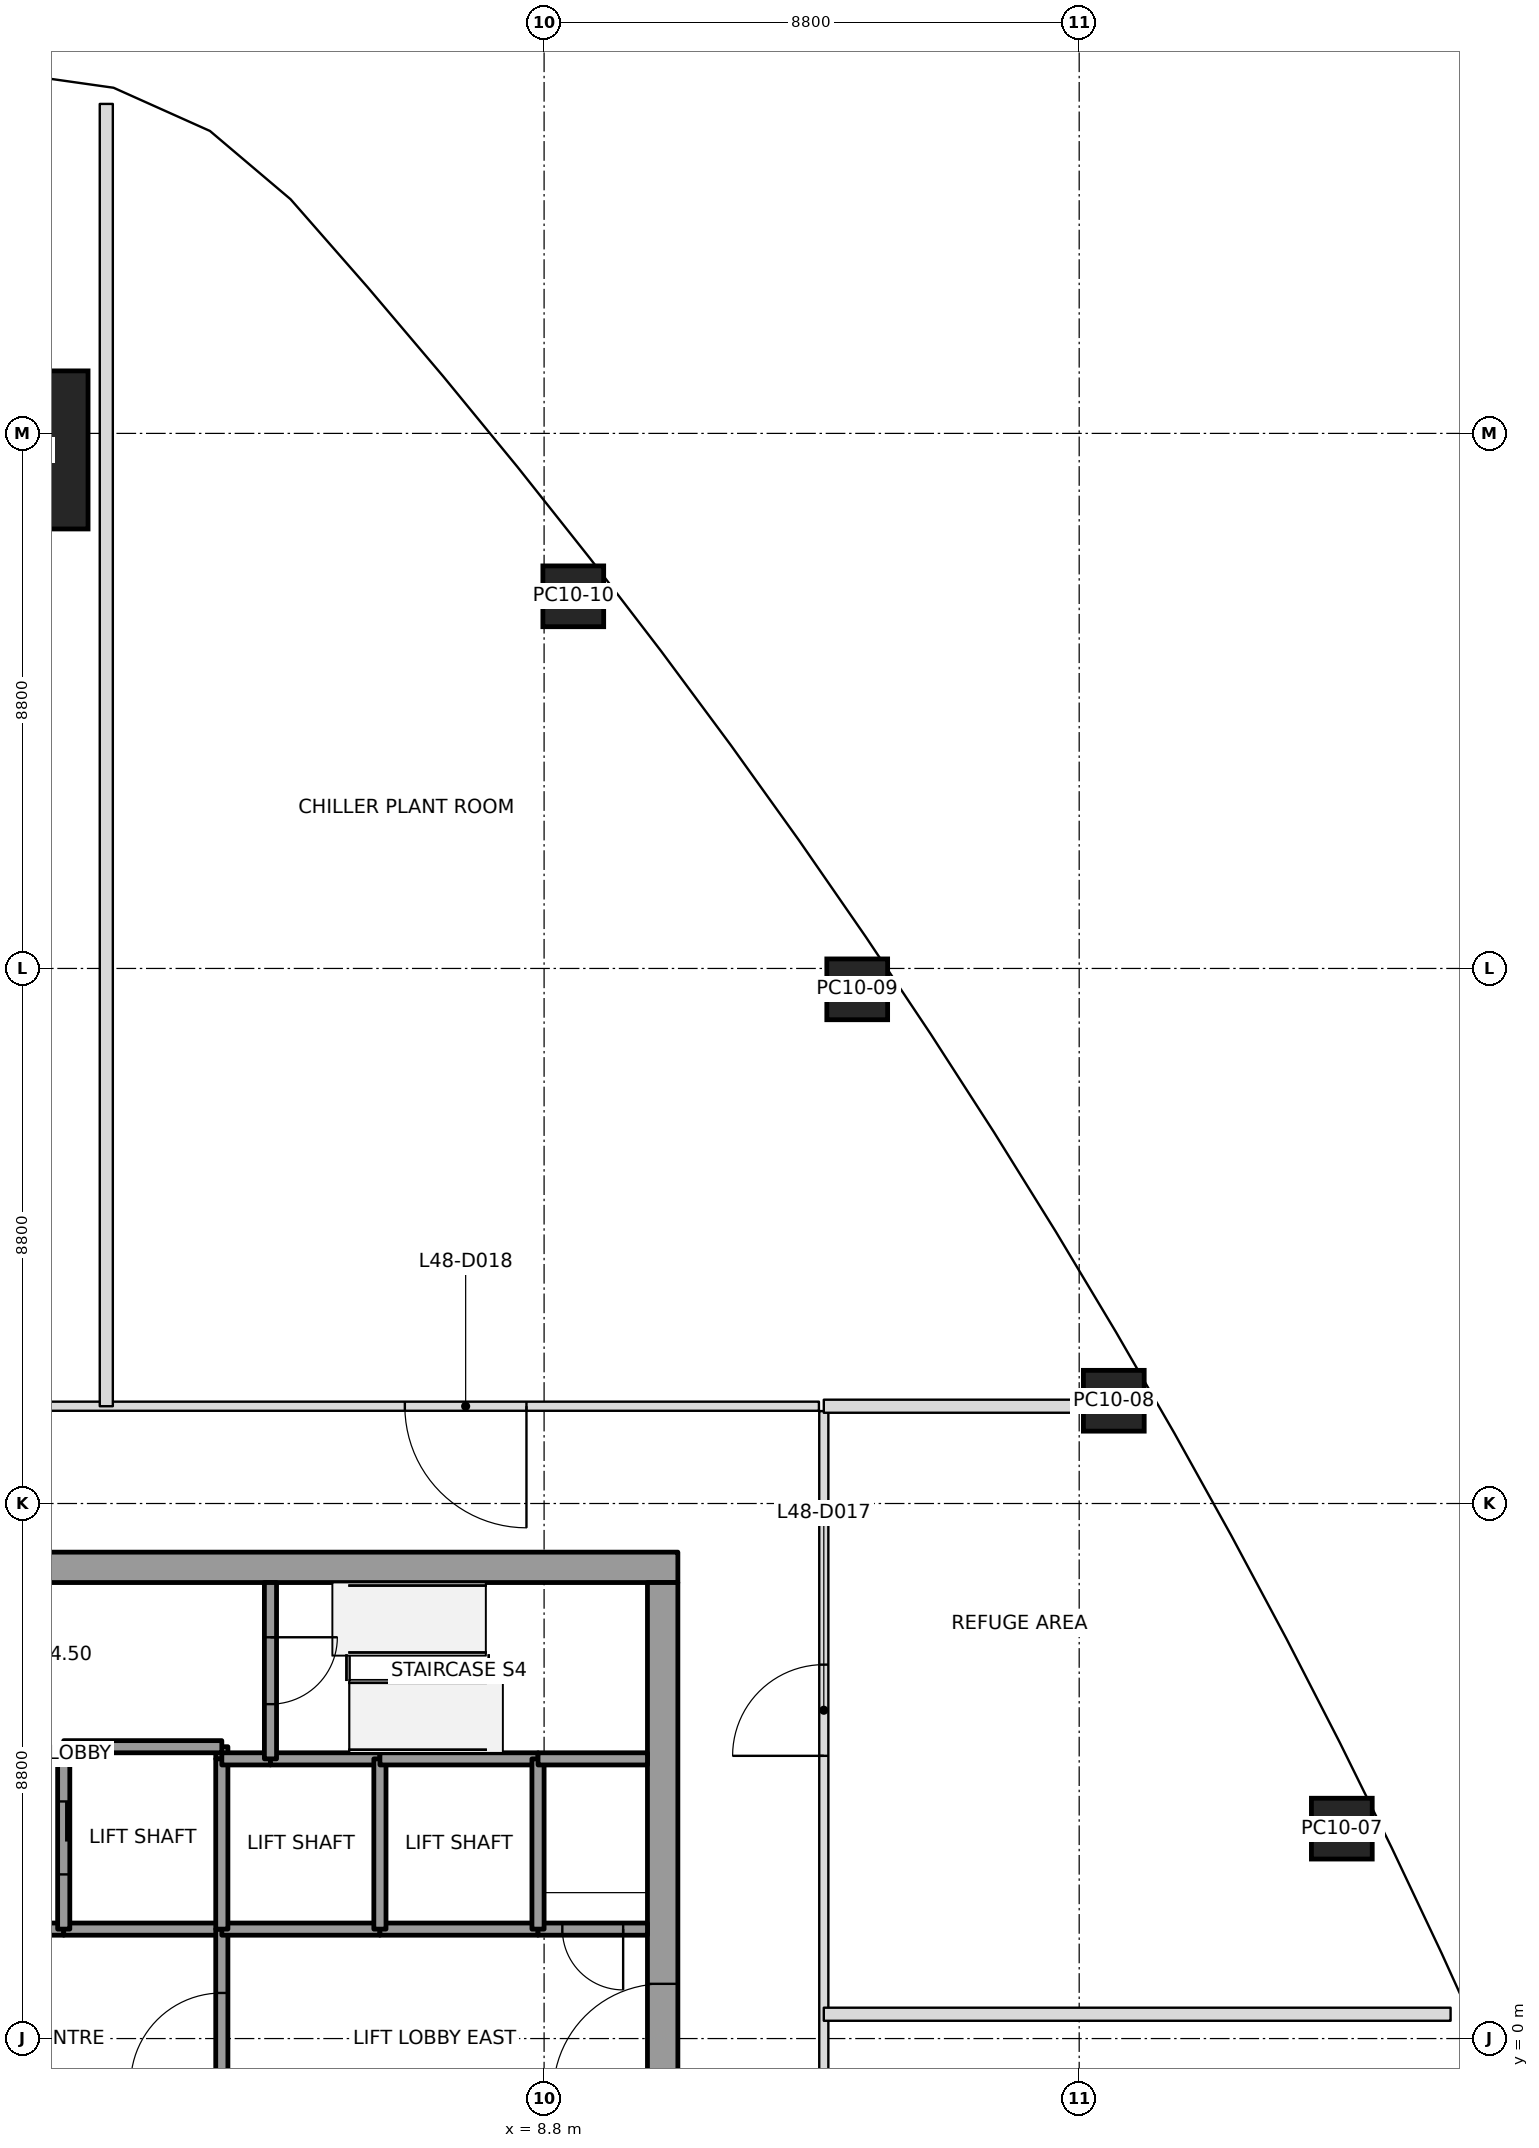
"""IFC4 building model, lengths in metres.
Left out: names, types, materials, properties, quantities, classifications, styles, units other than length and angle.
Written with IfcOpenShell. Run it as: python <this file> out.ifc"""

import sys

from ifc_helpers import new_model, si_unit, direction, frame, frame_2d, origin, origin_2d, place, context, subcontext, project, spatial, rectangle, extrude, clip, halfspace, element, fill, save


model = new_model("IFC4")
c1 = context("Model", 3, precision=1e-05, world=origin(), true_north=direction((0.0, 1.0)))
c2 = subcontext(c1, "Body", "Model", "MODEL_VIEW")
j1 = project(units=[si_unit("LENGTHUNIT", "METRE"), si_unit("PLANEANGLEUNIT", "RADIAN")], contexts=[c1])
p1 = place(None, origin())
s1 = spatial("IfcSite", under=j1, at=p1, CompositionType="ELEMENT")
p2 = place(p1, origin())
s2 = spatial("IfcBuilding", under=s1, at=p2, CompositionType="ELEMENT")
p3 = place(p2, frame((0.0, 0.0, 213.8)))
s3 = spatial("IfcBuildingStorey", under=s2, at=p3, CompositionType="ELEMENT", Elevation=213.8)
p4 = place(p3, frame((0.0, 26.128, 0.0), z_axis=(0.0, -0.021520080249, 0.999768416258), x_axis=(1.0, 0.0, 0.0)))
e1 = element("IfcColumn", 1, at=p4, inside=s3, PredefinedType="COLUMN", context=c2, shape_type="SweptSolid", body=[
    clip(clip(extrude(rectangle(XDim=2.6, YDim=2.6, at=origin_2d()), origin(), (0.0, 0.0, 1.0), 6.001), halfspace(frame((0.0, 0.0, 0.007)), True)), halfspace(frame((0.0, 0.0, 5.999)), False)),
])
p5 = place(p3, frame((21.919, 3.452, 0.0), z_axis=(-0.009358305185, 0.001383401636, 0.999955253161), x_axis=(-0.439982595299, 0.897990304012, -0.005360012502)))
e2 = element("IfcColumn", 2, at=p5, inside=s3, PredefinedType="COLUMN", context=c2, shape_type="SweptSolid", body=[
    clip(clip(extrude(rectangle(XDim=1.0, YDim=1.0, at=origin_2d()), origin(), (0.0, 0.0, 1.0), 6.0), halfspace(frame((0.0, 0.0, 0.002)), True)), halfspace(frame((0.0, 0.0, 6.0)), False)),
])
p6 = place(p3, frame((18.169, 10.49, 0.0), z_axis=(-0.006591605453, -0.00382475872, 0.999970960558), x_axis=(-0.499989137566, 0.866031674963, 1.6631558e-05)))
e3 = element("IfcColumn", 3, at=p6, inside=s3, PredefinedType="COLUMN", context=c2, shape_type="SweptSolid", body=[
    clip(clip(extrude(rectangle(XDim=1.0, YDim=1.0, at=origin_2d()), origin(), (0.0, 0.0, 1.0), 6.0), halfspace(frame((0.0, 0.0, 0.001)), True)), halfspace(frame((0.0, 0.0, 6.0)), False)),
])
p7 = place(p3, frame((13.95, 17.257, 0.0), z_axis=(-0.003539878893, -0.008829353101, 0.999954754867), x_axis=(-0.557683667704, 0.830036296174, 0.00535479318)))
e4 = element("IfcColumn", 4, at=p7, inside=s3, PredefinedType="COLUMN", context=c2, shape_type="SweptSolid", body=[
    clip(clip(extrude(rectangle(XDim=1.0, YDim=1.0, at=origin_2d()), origin(), (0.0, 0.0, 1.0), 6.0), halfspace(frame((0.0, 0.0, 0.002)), True)), halfspace(frame((0.0, 0.0, 6.0)), False)),
])
p8 = place(p3, frame((9.28, 23.721, 0.0), z_axis=(-0.000162745295, -0.013629918492, 0.999907095102), x_axis=(-0.612796713111, 0.790168535194, 0.010671194354)))
e5 = element("IfcColumn", 5, at=p8, inside=s3, PredefinedType="COLUMN", context=c2, shape_type="SweptSolid", body=[
    clip(clip(extrude(rectangle(XDim=1.0, YDim=1.0, at=origin_2d()), origin(), (0.0, 0.0, 1.0), 6.0), halfspace(frame((0.0, 0.0, 0.003)), True)), halfspace(frame((0.0, 0.0, 6.0)), False)),
])
p9 = place(p3, frame((-11.0, 7.75, 0.0), z_axis=(0.0, 0.0, 1.0), x_axis=(1.0, 0.0, 0.0)))
e6 = element("IfcWall", 6, at=p9, inside=s3, PredefinedType="SHEAR", context=c2, shape_type="SweptSolid", body=[
    extrude(rectangle(XDim=22.0, YDim=0.5, at=frame_2d((11.0, 0.0))), origin(), (0.0, 0.0, 1.0), 6.0),
])
p10 = place(p9, frame((8.55, 0.0, 0.0)))
e7 = element("IfcOpeningElement", 7, at=p10, cuts=e6, PredefinedType="OPENING", context=c2, shape_type="SweptSolid", body=[
    extrude(rectangle(XDim=1.1, YDim=2.1, at=frame_2d((0.55, 1.05))), frame((0.0, 0.25, 0.0), z_axis=(0.0, -1.0, 0.0), x_axis=(1.0, 0.0, 0.0)), (0.0, 0.0, 1.0), 0.5),
])
p11 = place(p3, frame((10.75, -7.5, 0.0), z_axis=(0.0, 0.0, 1.0), x_axis=(0.0, 1.0, 0.0)))
e8 = element("IfcWall", 8, at=p11, inside=s3, PredefinedType="SHEAR", context=c2, shape_type="SweptSolid", body=[
    extrude(rectangle(XDim=15.0, YDim=0.5, at=frame_2d((7.5, 0.0))), origin(), (0.0, 0.0, 1.0), 6.0),
])
p12 = place(p11, frame((6.6, 0.0, 0.0)))
e9 = element("IfcOpeningElement", 9, at=p12, cuts=e8, PredefinedType="OPENING", context=c2, shape_type="SweptSolid", body=[
    extrude(rectangle(XDim=1.8, YDim=2.1, at=frame_2d((0.9, 1.05))), frame((0.0, 0.25, 0.0), z_axis=(0.0, -1.0, 0.0), x_axis=(1.0, 0.0, 0.0)), (0.0, 0.0, 1.0), 0.5),
])
p13 = place(p3, frame((0.9, 1.8, 0.0), z_axis=(0.0, 0.0, 1.0), x_axis=(-1.0, 0.0, 0.0)))
e10 = element("IfcWall", 10, at=p13, inside=s3, PredefinedType="SOLIDWALL", context=c2, shape_type="SweptSolid", body=[
    extrude(rectangle(XDim=1.8, YDim=0.2, at=frame_2d((0.9, 0.0))), origin(), (0.0, 0.0, 1.0), 5.85),
])
p14 = place(p13, frame((0.35, 0.0, 0.0)))
e11 = element("IfcOpeningElement", 11, at=p14, cuts=e10, PredefinedType="OPENING", context=c2, shape_type="SweptSolid", body=[
    extrude(rectangle(XDim=1.1, YDim=2.1, at=frame_2d((0.55, 1.05))), frame((0.0, 0.1, 0.0), z_axis=(0.0, -1.0, 0.0), x_axis=(1.0, 0.0, 0.0)), (0.0, 0.0, 1.0), 0.2),
])
p15 = place(p3, frame((3.5, 1.8, 0.0), z_axis=(0.0, 0.0, 1.0), x_axis=(-1.0, 0.0, 0.0)))
e12 = element("IfcWall", 12, at=p15, inside=s3, PredefinedType="SOLIDWALL", context=c2, shape_type="SweptSolid", body=[
    extrude(rectangle(XDim=2.6, YDim=0.2, at=frame_2d((1.3, 0.0))), origin(), (0.0, 0.0, 1.0), 5.85),
])
p16 = place(p3, frame((3.5, 4.6, 0.0), z_axis=(0.0, 0.0, 1.0), x_axis=(0.0, 1.0, 0.0)))
e13 = element("IfcWall", 13, at=p16, inside=s3, PredefinedType="SOLIDWALL", context=c2, shape_type="SweptSolid", body=[
    extrude(rectangle(XDim=0.2, YDim=0.2, at=frame_2d((0.1, 0.0))), origin(), (0.0, 0.0, 1.0), 5.85),
])
p17 = place(p3, frame((3.5, 4.8, 0.0), z_axis=(0.0, 0.0, 1.0), x_axis=(-1.0, 0.0, 0.0)))
e14 = element("IfcWall", 14, at=p17, inside=s3, PredefinedType="SOLIDWALL", context=c2, shape_type="SweptSolid", body=[
    extrude(rectangle(XDim=2.6, YDim=0.2, at=frame_2d((1.3, 0.0))), origin(), (0.0, 0.0, 1.0), 5.85),
])
p18 = place(p3, frame((0.9, 4.8, 0.0), z_axis=(0.0, 0.0, 1.0), x_axis=(0.0, -1.0, 0.0)))
e15 = element("IfcWall", 15, at=p18, inside=s3, PredefinedType="SOLIDWALL", context=c2, shape_type="SweptSolid", body=[
    extrude(rectangle(XDim=3.0, YDim=0.2, at=frame_2d((1.5, 0.0))), origin(), (0.0, 0.0, 1.0), 5.85),
])
p19 = place(p18, frame((0.9, 0.0, 0.0)))
e16 = element("IfcOpeningElement", 16, at=p19, cuts=e15, PredefinedType="OPENING", context=c2, shape_type="SweptSolid", body=[
    extrude(rectangle(XDim=1.2, YDim=2.1, at=frame_2d((0.6, 1.05))), frame((0.0, 0.1, 0.0), z_axis=(0.0, -1.0, 0.0), x_axis=(1.0, 0.0, 0.0)), (0.0, 0.0, 1.0), 0.2),
])
p20 = place(p3, frame((3.5, -1.8, 0.0), z_axis=(0.0, 0.0, 1.0), x_axis=(0.0, 1.0, 0.0)))
e17 = element("IfcWall", 17, at=p20, inside=s3, PredefinedType="SOLIDWALL", context=c2, shape_type="SweptSolid", body=[
    extrude(rectangle(XDim=3.6, YDim=0.2, at=frame_2d((1.8, 0.0))), origin(), (0.0, 0.0, 1.0), 5.85),
])
p21 = place(p20, frame((1.05, 0.0, 0.0)))
e18 = element("IfcOpeningElement", 18, at=p21, cuts=e17, PredefinedType="OPENING", context=c2, shape_type="SweptSolid", body=[
    extrude(rectangle(XDim=1.5, YDim=2.1, at=frame_2d((0.75, 1.05))), frame((0.0, 0.1, 0.0), z_axis=(0.0, -1.0, 0.0), x_axis=(1.0, 0.0, 0.0)), (0.0, 0.0, 1.0), 0.2),
])
p22 = place(p3, frame((6.1, 1.8, 0.0), z_axis=(0.0, 0.0, 1.0), x_axis=(-1.0, 0.0, 0.0)))
e19 = element("IfcWall", 19, at=p22, inside=s3, PredefinedType="SOLIDWALL", context=c2, shape_type="SweptSolid", body=[
    extrude(rectangle(XDim=2.6, YDim=0.2, at=frame_2d((1.3, 0.0))), origin(), (0.0, 0.0, 1.0), 5.85),
])
p23 = place(p3, frame((3.5, 1.8, 0.0), z_axis=(0.0, 0.0, 1.0), x_axis=(0.0, 1.0, 0.0)))
e20 = element("IfcWall", 20, at=p23, inside=s3, PredefinedType="SOLIDWALL", context=c2, shape_type="SweptSolid", body=[
    extrude(rectangle(XDim=2.8, YDim=0.2, at=frame_2d((1.4, 0.0))), origin(), (0.0, 0.0, 1.0), 5.85),
])
p24 = place(p3, frame((4.3, 4.6, 0.0), z_axis=(0.0, 0.0, 1.0), x_axis=(-1.0, 0.0, 0.0)))
e21 = element("IfcWall", 21, at=p24, inside=s3, PredefinedType="SOLIDWALL", context=c2, shape_type="SweptSolid", body=[
    extrude(rectangle(XDim=0.8, YDim=0.2, at=frame_2d((0.4, 0.0))), origin(), (0.0, 0.0, 1.0), 5.85),
])
p25 = place(p3, frame((6.1, 4.6, 0.0), z_axis=(0.0, 0.0, 1.0), x_axis=(-1.0, 0.0, 0.0)))
e22 = element("IfcWall", 22, at=p25, inside=s3, PredefinedType="SOLIDWALL", context=c2, shape_type="SweptSolid", body=[
    extrude(rectangle(XDim=1.8, YDim=0.2, at=frame_2d((0.9, 0.0))), origin(), (0.0, 0.0, 1.0), 5.85),
])
p26 = place(p3, frame((4.3, 7.5, 0.0), z_axis=(0.0, 0.0, 1.0), x_axis=(0.0, -1.0, 0.0)))
e23 = element("IfcWall", 23, at=p26, inside=s3, PredefinedType="SOLIDWALL", context=c2, shape_type="SweptSolid", body=[
    extrude(rectangle(XDim=2.9, YDim=0.2, at=frame_2d((1.45, 0.0))), origin(), (0.0, 0.0, 1.0), 5.85),
])
p27 = place(p26, frame((0.9, 0.0, 0.0)))
e24 = element("IfcOpeningElement", 24, at=p27, cuts=e23, PredefinedType="OPENING", context=c2, shape_type="SweptSolid", body=[
    extrude(rectangle(XDim=1.1, YDim=2.1, at=frame_2d((0.55, 1.05))), frame((0.0, 0.1, 0.0), z_axis=(0.0, -1.0, 0.0), x_axis=(1.0, 0.0, 0.0)), (0.0, 0.0, 1.0), 0.2),
])
p28 = place(p3, frame((8.7, 1.8, 0.0), z_axis=(0.0, 0.0, 1.0), x_axis=(-1.0, 0.0, 0.0)))
e25 = element("IfcWall", 25, at=p28, inside=s3, PredefinedType="SOLIDWALL", context=c2, shape_type="SweptSolid", body=[
    extrude(rectangle(XDim=2.6, YDim=0.2, at=frame_2d((1.3, 0.0))), origin(), (0.0, 0.0, 1.0), 5.85),
])
p29 = place(p3, frame((6.1, 1.8, 0.0), z_axis=(0.0, 0.0, 1.0), x_axis=(0.0, 1.0, 0.0)))
e26 = element("IfcWall", 26, at=p29, inside=s3, PredefinedType="SOLIDWALL", context=c2, shape_type="SweptSolid", body=[
    extrude(rectangle(XDim=2.8, YDim=0.2, at=frame_2d((1.4, 0.0))), origin(), (0.0, 0.0, 1.0), 5.85),
])
p30 = place(p3, frame((8.7, 4.6, 0.0), z_axis=(0.0, 0.0, 1.0), x_axis=(-1.0, 0.0, 0.0)))
e27 = element("IfcWall", 27, at=p30, inside=s3, PredefinedType="SOLIDWALL", context=c2, shape_type="SweptSolid", body=[
    extrude(rectangle(XDim=2.6, YDim=0.2, at=frame_2d((1.3, 0.0))), origin(), (0.0, 0.0, 1.0), 5.85),
])
p31 = place(p3, frame((10.5, 1.8, 0.0), z_axis=(0.0, 0.0, 1.0), x_axis=(-1.0, 0.0, 0.0)))
e28 = element("IfcWall", 28, at=p31, inside=s3, PredefinedType="SOLIDWALL", context=c2, shape_type="SweptSolid", body=[
    extrude(rectangle(XDim=1.8, YDim=0.2, at=frame_2d((0.9, 0.0))), origin(), (0.0, 0.0, 1.0), 5.85),
])
p32 = place(p31, frame((0.4, 0.0, 0.0)))
e29 = element("IfcOpeningElement", 29, at=p32, cuts=e28, PredefinedType="OPENING", context=c2, shape_type="SweptSolid", body=[
    extrude(rectangle(XDim=1.0, YDim=2.1, at=frame_2d((0.5, 1.05))), frame((0.0, 0.1, 0.0), z_axis=(0.0, -1.0, 0.0), x_axis=(1.0, 0.0, 0.0)), (0.0, 0.0, 1.0), 0.2),
])
p33 = place(p3, frame((8.7, 4.6, 0.0), z_axis=(0.0, 0.0, 1.0), x_axis=(0.0, -1.0, 0.0)))
e30 = element("IfcWall", 30, at=p33, inside=s3, PredefinedType="SOLIDWALL", context=c2, shape_type="SweptSolid", body=[
    extrude(rectangle(XDim=2.8, YDim=0.2, at=frame_2d((1.4, 0.0))), origin(), (0.0, 0.0, 1.0), 5.85),
])
p34 = place(p3, frame((10.5, 4.6, 0.0), z_axis=(0.0, 0.0, 1.0), x_axis=(-1.0, 0.0, 0.0)))
e31 = element("IfcWall", 31, at=p34, inside=s3, PredefinedType="SOLIDWALL", context=c2, shape_type="SweptSolid", body=[
    extrude(rectangle(XDim=1.8, YDim=0.2, at=frame_2d((0.9, 0.0))), origin(), (0.0, 0.0, 1.0), 5.85),
])
p35 = place(p3, frame((1.6, 10.4, 0.0), z_axis=(0.0, 0.0, 1.0), x_axis=(0.0, 1.0, 0.0)))
e32 = element("IfcWall", 32, at=p35, inside=s3, PredefinedType="PARTITIONING", context=c2, shape_type="SweptSolid", body=[
    extrude(rectangle(XDim=21.419, YDim=0.215, at=frame_2d((10.709, 0.0))), origin(), (0.0, 0.0, 1.0), 5.234),
])
p36 = place(p3, frame((23.708, 0.4, 0.0), z_axis=(0.0, 0.0, 1.0), x_axis=(-1.0, 0.0, 0.0)))
e33 = element("IfcWall", 33, at=p36, inside=s3, PredefinedType="PARTITIONING", context=c2, shape_type="SweptSolid", body=[
    extrude(rectangle(XDim=10.308, YDim=0.215, at=frame_2d((5.154, 0.0))), origin(), (0.0, 0.0, 1.0), 5.234),
])
p37 = place(p3, frame((13.4, 10.4, 0.0), z_axis=(0.0, 0.0, 1.0), x_axis=(1.0, 0.0, 0.0)))
e34 = element("IfcWall", 34, at=p37, inside=s3, PredefinedType="PARTITIONING", context=c2, shape_type="SweptSolid", body=[
    extrude(rectangle(XDim=5.186, YDim=0.215, at=frame_2d((2.593, 0.0))), origin(), (0.0, 0.0, 1.0), 5.45),
])
p38 = place(p3, frame((13.32, 10.4, 0.0), z_axis=(0.0, 0.0, 1.0), x_axis=(-1.0, 0.0, 0.0)))
e35 = element("IfcWall", 35, at=p38, inside=s3, PredefinedType="PARTITIONING", context=c2, shape_type="SweptSolid", body=[
    extrude(rectangle(XDim=26.64, YDim=0.15, at=frame_2d((13.32, 0.0))), origin(), (0.0, 0.0, 1.0), 5.233),
])
p39 = place(p38, frame((4.81, 0.0, 0.0)))
e36 = element("IfcOpeningElement", 36, at=p39, cuts=e35, PredefinedType="OPENING", context=c2, shape_type="SweptSolid", body=[
    extrude(rectangle(XDim=2.0, YDim=2.4, at=frame_2d((1.0, 1.2))), frame((0.0, 0.075, 0.0), z_axis=(0.0, -1.0, 0.0), x_axis=(1.0, 0.0, 0.0)), (0.0, 0.0, 1.0), 0.15),
])
p40 = place(p38, frame((18.23, 0.0, 0.0)))
e37 = element("IfcOpeningElement", 37, at=p40, cuts=e35, PredefinedType="OPENING", context=c2, shape_type="SweptSolid", body=[
    extrude(rectangle(XDim=2.0, YDim=2.4, at=frame_2d((1.0, 1.2))), frame((0.0, 0.075, 0.0), z_axis=(0.0, -1.0, 0.0), x_axis=(1.0, 0.0, 0.0)), (0.0, 0.0, 1.0), 0.15),
])
p41 = place(p3, frame((13.4, -10.32, 0.0), z_axis=(0.0, 0.0, 1.0), x_axis=(0.0, 1.0, 0.0)))
e38 = element("IfcWall", 38, at=p41, inside=s3, PredefinedType="PARTITIONING", context=c2, shape_type="SweptSolid", body=[
    extrude(rectangle(XDim=20.64, YDim=0.15, at=frame_2d((10.32, 0.0))), origin(), (0.0, 0.0, 1.0), 5.233),
])
p42 = place(p41, frame((14.97, 0.0, 0.0)))
e39 = element("IfcOpeningElement", 39, at=p42, cuts=e38, PredefinedType="OPENING", context=c2, shape_type="SweptSolid", body=[
    extrude(rectangle(XDim=1.5, YDim=2.4, at=frame_2d((0.75, 1.2))), frame((0.0, 0.075, 0.0), z_axis=(0.0, -1.0, 0.0), x_axis=(1.0, 0.0, 0.0)), (0.0, 0.0, 1.0), 0.15),
])
p43 = place(p41, frame((4.31, 0.0, 0.0)))
e40 = element("IfcOpeningElement", 40, at=p43, cuts=e38, PredefinedType="OPENING", context=c2, shape_type="SweptSolid", body=[
    extrude(rectangle(XDim=2.0, YDim=2.4, at=frame_2d((1.0, 1.2))), frame((0.0, 0.075, 0.0), z_axis=(0.0, -1.0, 0.0), x_axis=(1.0, 0.0, 0.0)), (0.0, 0.0, 1.0), 0.15),
])
p44 = place(p42, origin())
e41 = element("IfcDoor", 41, at=p44, inside=s3, OperationType="DOUBLE_DOOR_SINGLE_SWING", PredefinedType="DOOR", context=c2, shape_type="SweptSolid", body=[
    extrude(rectangle(XDim=1.5, YDim=2.4, at=frame_2d((0.75, 1.2))), frame((0.0, 0.025, 0.0), z_axis=(0.0, -1.0, 0.0), x_axis=(1.0, 0.0, 0.0)), (0.0, 0.0, 1.0), 0.05),
])
fill(e39, e41)
p45 = place(p39, origin())
e42 = element("IfcDoor", 42, at=p45, inside=s3, OperationType="DOUBLE_DOOR_SINGLE_SWING", PredefinedType="DOOR", context=c2, shape_type="SweptSolid", body=[
    extrude(rectangle(XDim=2.0, YDim=2.4, at=frame_2d((1.0, 1.2))), frame((0.0, 0.025, 0.0), z_axis=(0.0, -1.0, 0.0), x_axis=(1.0, 0.0, 0.0)), (0.0, 0.0, 1.0), 0.05),
])
fill(e36, e42)
p46 = place(p19, origin())
e43 = element("IfcDoor", 43, at=p46, inside=s3, OperationType="SLIDING_TO_RIGHT", PredefinedType="DOOR", context=c2, shape_type="SweptSolid", body=[
    extrude(rectangle(XDim=1.2, YDim=2.1, at=frame_2d((0.6, 1.05))), frame((0.0, 0.025, 0.0), z_axis=(0.0, -1.0, 0.0), x_axis=(1.0, 0.0, 0.0)), (0.0, 0.0, 1.0), 0.05),
])
fill(e16, e43)
p47 = place(p21, origin())
e44 = element("IfcDoor", 44, at=p47, inside=s3, OperationType="DOUBLE_DOOR_SINGLE_SWING", PredefinedType="DOOR", context=c2, shape_type="SweptSolid", body=[
    extrude(rectangle(XDim=1.5, YDim=2.1, at=frame_2d((0.75, 1.05))), frame((0.0, 0.025, 0.0), z_axis=(0.0, -1.0, 0.0), x_axis=(1.0, 0.0, 0.0)), (0.0, 0.0, 1.0), 0.05),
])
fill(e18, e44)
p48 = place(p32, origin())
e45 = element("IfcDoor", 45, at=p48, inside=s3, OperationType="SINGLE_SWING_LEFT", PredefinedType="DOOR", context=c2, shape_type="SweptSolid", body=[
    extrude(rectangle(XDim=1.0, YDim=2.1, at=frame_2d((0.5, 1.05))), frame((0.0, 0.025, 0.0), z_axis=(0.0, -1.0, 0.0), x_axis=(1.0, 0.0, 0.0)), (0.0, 0.0, 1.0), 0.05),
])
fill(e29, e45)
p49 = place(p27, origin())
e46 = element("IfcDoor", 46, at=p49, inside=s3, OperationType="SINGLE_SWING_LEFT", PredefinedType="DOOR", context=c2, shape_type="SweptSolid", body=[
    extrude(rectangle(XDim=1.1, YDim=2.1, at=frame_2d((0.55, 1.05))), frame((0.0, 0.025, 0.0), z_axis=(0.0, -1.0, 0.0), x_axis=(1.0, 0.0, 0.0)), (0.0, 0.0, 1.0), 0.05),
])
fill(e24, e46)
p50 = place(p12, origin())
e47 = element("IfcDoor", 47, at=p50, inside=s3, OperationType="DOUBLE_DOOR_SINGLE_SWING", PredefinedType="DOOR", context=c2, shape_type="SweptSolid", body=[
    extrude(rectangle(XDim=1.8, YDim=2.1, at=frame_2d((0.9, 1.05))), frame((0.0, 0.025, 0.0), z_axis=(0.0, -1.0, 0.0), x_axis=(1.0, 0.0, 0.0)), (0.0, 0.0, 1.0), 0.05),
])
fill(e9, e47)
save(model, sys.argv[1])
